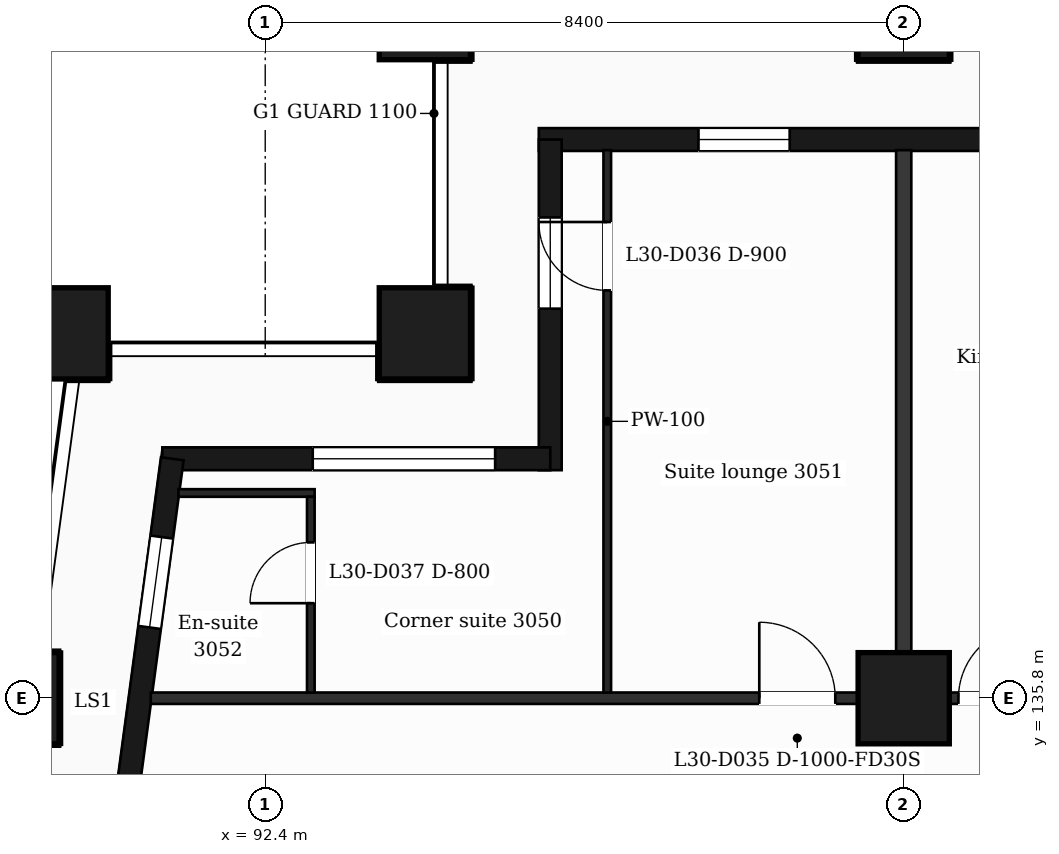
"""IFC4 building model, lengths in metres.
Left out: names, types, materials, properties, quantities, classifications, styles, units other than length and angle.
Written with IfcOpenShell. Run it as: python <this file> out.ifc"""

import sys

from ifc_helpers import new_model, si_unit, direction, frame, frame_2d, origin, origin_2d, place, context, subcontext, project, spatial, rectangle, extrude, element, fill, save


model = new_model("IFC4")
c1 = context("Model", 3, precision=1e-05, world=origin(), true_north=direction((0.0, 1.0)))
c2 = subcontext(c1, "Body", "Model", "MODEL_VIEW")
j1 = project(units=[si_unit("LENGTHUNIT", "METRE"), si_unit("PLANEANGLEUNIT", "RADIAN")], contexts=[c1])
p1 = place(None, origin())
s1 = spatial("IfcSite", under=j1, at=p1, CompositionType="ELEMENT")
p2 = place(p1, origin())
s2 = spatial("IfcBuilding", under=s1, at=p2, CompositionType="ELEMENT")
p3 = place(p2, frame((0.0, 0.0, 128.0)))
s3 = spatial("IfcBuildingStorey", under=s2, at=p3, CompositionType="ELEMENT", Elevation=128.0)
for number, where, z_axis, x_axis in (
    (1, (94.5, 140.6, 0.0), (0.0, 0.0, 1.0), (1.0, 0.0, 0.0)),
    (2, (89.735, 140.6, 0.0), (0.0, 0.0, 1.0), (1.0, 0.0, 0.0)),
    (3, (100.8, 135.8, 0.0), (0.0, 0.0, 1.0), (1.0, 0.0, 0.0)),
    (4, (89.088, 135.8, 0.0), (0.0, 0.0, 1.0), (1.0, 0.0, 0.0)),
    (5, (100.8, 144.8, 0.0), (0.0, 0.0, 1.0), (1.0, 0.0, 0.0)),
    (6, (94.5, 144.8, 0.0), (0.0, 0.0, 1.0), (1.0, 0.0, 0.0)),
):
    element("IfcColumn", number, at=place(p3, frame(where, z_axis=z_axis, x_axis=x_axis)), inside=s3, PredefinedType="COLUMN", context=c2, shape_type="SweptSolid", body=[
        extrude(rectangle(XDim=1.2, YDim=1.2, at=origin_2d()), origin(), (0.0, 0.0, 1.0), 3.7),
    ])
p4 = place(p3, frame((110.4, 143.15, 0.0), z_axis=(0.0, 0.0, 1.0), x_axis=(-1.0, 0.0, 0.0)))
e7 = element("IfcWall", 7, at=p4, inside=s3, PredefinedType="SOLIDWALL", context=c2, shape_type="SweptSolid", body=[
    extrude(rectangle(XDim=14.4, YDim=0.3, at=frame_2d((7.2, 0.0))), origin(), (0.0, 0.0, 1.0), 3.38),
])
p5 = place(p4, frame((2.1, 0.0, 0.9)))
e8 = element("IfcOpeningElement", 8, at=p5, cuts=e7, PredefinedType="OPENING", context=c2, shape_type="SweptSolid", body=[
    extrude(rectangle(XDim=2.4, YDim=2.1, at=frame_2d((1.2, 1.05))), frame((0.0, 0.16, 0.0), z_axis=(0.0, -1.0, 0.0), x_axis=(1.0, 0.0, 0.0)), (0.0, 0.0, 1.0), 0.32),
])
p6 = place(p4, frame((6.9, 0.0, 0.0)))
e9 = element("IfcOpeningElement", 9, at=p6, cuts=e7, PredefinedType="OPENING", context=c2, shape_type="SweptSolid", body=[
    extrude(rectangle(XDim=1.2, YDim=2.4, at=frame_2d((0.6, 1.2))), frame((0.0, 0.16, 0.0), z_axis=(0.0, -1.0, 0.0), x_axis=(1.0, 0.0, 0.0)), (0.0, 0.0, 1.0), 0.32),
])
p7 = place(p4, frame((11.1, 0.0, 0.9)))
e10 = element("IfcOpeningElement", 10, at=p7, cuts=e7, PredefinedType="OPENING", context=c2, shape_type="SweptSolid", body=[
    extrude(rectangle(XDim=1.2, YDim=2.1, at=frame_2d((0.6, 1.05))), frame((0.0, 0.16, 0.0), z_axis=(0.0, -1.0, 0.0), x_axis=(1.0, 0.0, 0.0)), (0.0, 0.0, 1.0), 0.32),
])
p8 = place(p3, frame((96.15, 143.15, 0.0), z_axis=(0.0, 0.0, 1.0), x_axis=(0.0, -1.0, 0.0)))
e11 = element("IfcWall", 11, at=p8, inside=s3, PredefinedType="SOLIDWALL", context=c2, shape_type="SweptSolid", body=[
    extrude(rectangle(XDim=4.35, YDim=0.3, at=frame_2d((2.175, 0.0))), origin(), (0.0, 0.0, 1.0), 3.38),
])
p9 = place(p8, frame((1.025, 0.0, 0.9)))
e12 = element("IfcOpeningElement", 12, at=p9, cuts=e11, PredefinedType="OPENING", context=c2, shape_type="SweptSolid", body=[
    extrude(rectangle(XDim=1.2, YDim=2.1, at=frame_2d((0.6, 1.05))), frame((0.0, 0.16, 0.0), z_axis=(0.0, -1.0, 0.0), x_axis=(1.0, 0.0, 0.0)), (0.0, 0.0, 1.0), 0.32),
])
p10 = place(p3, frame((96.15, 138.95, 0.0), z_axis=(0.0, 0.0, 1.0), x_axis=(-1.0, 0.0, 0.0)))
e13 = element("IfcWall", 13, at=p10, inside=s3, PredefinedType="SOLIDWALL", context=c2, shape_type="SweptSolid", body=[
    extrude(rectangle(XDim=5.104, YDim=0.3, at=frame_2d((2.552, 0.0))), origin(), (0.0, 0.0, 1.0), 3.38),
])
p11 = place(p10, frame((0.725, 0.0, 0.9)))
e14 = element("IfcOpeningElement", 14, at=p11, cuts=e13, PredefinedType="OPENING", context=c2, shape_type="SweptSolid", body=[
    extrude(rectangle(XDim=2.4, YDim=2.1, at=frame_2d((1.2, 1.05))), frame((0.0, 0.16, 0.0), z_axis=(0.0, -1.0, 0.0), x_axis=(1.0, 0.0, 0.0)), (0.0, 0.0, 1.0), 0.32),
])
p12 = place(p3, frame((91.177, 138.95, 0.0), z_axis=(0.0, 0.0, 1.0), x_axis=(-0.133426664613, -0.991058689065, 0.0)))
e15 = element("IfcWall", 15, at=p12, inside=s3, PredefinedType="SOLIDWALL", context=c2, shape_type="SweptSolid", body=[
    extrude(rectangle(XDim=6.609, YDim=0.3, at=frame_2d((3.305, 0.0))), origin(), (0.0, 0.0, 1.0), 3.38),
])
p13 = place(p12, frame((1.039, 0.0, 0.9)))
e16 = element("IfcOpeningElement", 16, at=p13, cuts=e15, PredefinedType="OPENING", context=c2, shape_type="SweptSolid", body=[
    extrude(rectangle(XDim=1.2, YDim=2.1, at=frame_2d((0.6, 1.05))), frame((0.0, 0.16, 0.0), z_axis=(0.0, -1.0, 0.0), x_axis=(1.0, 0.0, 0.0)), (0.0, 0.0, 1.0), 0.32),
])
p14 = place(p12, frame((4.294, 0.0, 0.0)))
e17 = element("IfcOpeningElement", 17, at=p14, cuts=e15, PredefinedType="OPENING", context=c2, shape_type="SweptSolid", body=[
    extrude(rectangle(XDim=1.2, YDim=2.4, at=frame_2d((0.6, 1.2))), frame((0.0, 0.16, 0.0), z_axis=(0.0, -1.0, 0.0), x_axis=(1.0, 0.0, 0.0)), (0.0, 0.0, 1.0), 0.32),
])
p15 = place(p3, frame((90.895, 135.8, 0.0), z_axis=(0.0, 0.0, 1.0), x_axis=(1.0, 0.0, 0.0)))
e18 = element("IfcWall", 18, at=p15, inside=s3, PredefinedType="PARTITIONING", context=c2, shape_type="SweptSolid", body=[
    extrude(rectangle(XDim=45.011, YDim=0.15, at=frame_2d((22.505, 0.0))), origin(), (0.0, 0.0, 1.0), 3.38),
])
p16 = place(p15, frame((8.005, 0.0, 0.0)))
e19 = element("IfcOpeningElement", 19, at=p16, cuts=e18, PredefinedType="OPENING", context=c2, shape_type="SweptSolid", body=[
    extrude(rectangle(XDim=1.0, YDim=2.1, at=frame_2d((0.5, 1.05))), frame((0.0, 0.085, 0.0), z_axis=(0.0, -1.0, 0.0), x_axis=(1.0, 0.0, 0.0)), (0.0, 0.0, 1.0), 0.17),
])
p17 = place(p15, frame((10.625, 0.0, 0.0)))
e20 = element("IfcOpeningElement", 20, at=p17, cuts=e18, PredefinedType="OPENING", context=c2, shape_type="SweptSolid", body=[
    extrude(rectangle(XDim=0.95, YDim=2.1, at=frame_2d((0.475, 1.05))), frame((0.0, 0.085, 0.0), z_axis=(0.0, -1.0, 0.0), x_axis=(1.0, 0.0, 0.0)), (0.0, 0.0, 1.0), 0.17),
])
p18 = place(p15, frame((14.38, 0.0, 0.0)))
e21 = element("IfcOpeningElement", 21, at=p18, cuts=e18, PredefinedType="OPENING", context=c2, shape_type="SweptSolid", body=[
    extrude(rectangle(XDim=0.95, YDim=2.1, at=frame_2d((0.475, 1.05))), frame((0.0, 0.085, 0.0), z_axis=(0.0, -1.0, 0.0), x_axis=(1.0, 0.0, 0.0)), (0.0, 0.0, 1.0), 0.17),
])
p19 = place(p15, frame((21.265, 0.0, 0.0)))
e22 = element("IfcOpeningElement", 22, at=p19, cuts=e18, PredefinedType="OPENING", context=c2, shape_type="SweptSolid", body=[
    extrude(rectangle(XDim=0.95, YDim=2.1, at=frame_2d((0.475, 1.05))), frame((0.0, 0.085, 0.0), z_axis=(0.0, -1.0, 0.0), x_axis=(1.0, 0.0, 0.0)), (0.0, 0.0, 1.0), 0.17),
])
p20 = place(p15, frame((30.835, 0.0, 0.0)))
e23 = element("IfcOpeningElement", 23, at=p20, cuts=e18, PredefinedType="OPENING", context=c2, shape_type="SweptSolid", body=[
    extrude(rectangle(XDim=0.95, YDim=2.1, at=frame_2d((0.475, 1.05))), frame((0.0, 0.085, 0.0), z_axis=(0.0, -1.0, 0.0), x_axis=(1.0, 0.0, 0.0)), (0.0, 0.0, 1.0), 0.17),
])
p21 = place(p15, frame((39.814, 0.0, 0.0)))
e24 = element("IfcOpeningElement", 24, at=p21, cuts=e18, PredefinedType="OPENING", context=c2, shape_type="SweptSolid", body=[
    extrude(rectangle(XDim=0.95, YDim=2.1, at=frame_2d((0.475, 1.05))), frame((0.0, 0.085, 0.0), z_axis=(0.0, -1.0, 0.0), x_axis=(1.0, 0.0, 0.0)), (0.0, 0.0, 1.0), 0.17),
])
p22 = place(p3, frame((91.258, 138.5, 0.0), z_axis=(0.0, 0.0, 1.0), x_axis=(1.0, 0.0, 0.0)))
e25 = element("IfcWall", 25, at=p22, inside=s3, PredefinedType="PARTITIONING", context=c2, shape_type="SweptSolid", body=[
    extrude(rectangle(XDim=1.792, YDim=0.1, at=frame_2d((0.896, 0.0))), origin(), (0.0, 0.0, 1.0), 3.38),
])
p23 = place(p3, frame((93.0, 135.875, 0.0), z_axis=(0.0, 0.0, 1.0), x_axis=(0.0, 1.0, 0.0)))
e26 = element("IfcWall", 26, at=p23, inside=s3, PredefinedType="PARTITIONING", context=c2, shape_type="SweptSolid", body=[
    extrude(rectangle(XDim=2.575, YDim=0.1, at=frame_2d((1.288, 0.0))), origin(), (0.0, 0.0, 1.0), 3.38),
])
p24 = place(p23, frame((1.175, 0.0, 0.0)))
e27 = element("IfcOpeningElement", 27, at=p24, cuts=e26, PredefinedType="OPENING", context=c2, shape_type="SweptSolid", body=[
    extrude(rectangle(XDim=0.8, YDim=2.1, at=frame_2d((0.4, 1.05))), frame((0.0, 0.06, 0.0), z_axis=(0.0, -1.0, 0.0), x_axis=(1.0, 0.0, 0.0)), (0.0, 0.0, 1.0), 0.12),
])
p25 = place(p3, frame((96.9, 135.875, 0.0), z_axis=(0.0, 0.0, 1.0), x_axis=(0.0, 1.0, 0.0)))
e28 = element("IfcWall", 28, at=p25, inside=s3, PredefinedType="PARTITIONING", context=c2, shape_type="SweptSolid", body=[
    extrude(rectangle(XDim=7.135, YDim=0.1, at=frame_2d((3.567, 0.0))), origin(), (0.0, 0.0, 1.0), 3.38),
])
p26 = place(p25, frame((5.29, 0.0, 0.0)))
e29 = element("IfcOpeningElement", 29, at=p26, cuts=e28, PredefinedType="OPENING", context=c2, shape_type="SweptSolid", body=[
    extrude(rectangle(XDim=0.9, YDim=2.1, at=frame_2d((0.45, 1.05))), frame((0.0, 0.06, 0.0), z_axis=(0.0, -1.0, 0.0), x_axis=(1.0, 0.0, 0.0)), (0.0, 0.0, 1.0), 0.12),
])
p27 = place(p3, frame((100.8, 135.875, 0.0), z_axis=(0.0, 0.0, 1.0), x_axis=(0.0, 1.0, 0.0)))
e30 = element("IfcWall", 30, at=p27, inside=s3, PredefinedType="PARTITIONING", context=c2, shape_type="SweptSolid", body=[
    extrude(rectangle(XDim=7.135, YDim=0.2, at=frame_2d((3.567, 0.0))), origin(), (0.0, 0.0, 1.0), 3.38),
])
p28 = place(p7, origin())
e31 = element("IfcWindow", 31, at=p28, inside=s3, PartitioningType="SINGLE_PANEL", PredefinedType="WINDOW", context=c2, shape_type="SweptSolid", body=[
    extrude(rectangle(XDim=1.2, YDim=2.1, at=frame_2d((0.6, 1.05))), frame((0.0, 0.03, 0.0), z_axis=(0.0, -1.0, 0.0), x_axis=(1.0, 0.0, 0.0)), (0.0, 0.0, 1.0), 0.06),
])
fill(e10, e31)
p29 = place(p9, origin())
e32 = element("IfcWindow", 32, at=p29, inside=s3, PartitioningType="SINGLE_PANEL", PredefinedType="WINDOW", context=c2, shape_type="SweptSolid", body=[
    extrude(rectangle(XDim=1.2, YDim=2.1, at=frame_2d((0.6, 1.05))), frame((0.0, 0.03, 0.0), z_axis=(0.0, -1.0, 0.0), x_axis=(1.0, 0.0, 0.0)), (0.0, 0.0, 1.0), 0.06),
])
fill(e12, e32)
p30 = place(p11, origin())
e33 = element("IfcWindow", 33, at=p30, inside=s3, PartitioningType="SINGLE_PANEL", PredefinedType="WINDOW", context=c2, shape_type="SweptSolid", body=[
    extrude(rectangle(XDim=2.4, YDim=2.1, at=frame_2d((1.2, 1.05))), frame((0.0, 0.03, 0.0), z_axis=(0.0, -1.0, 0.0), x_axis=(1.0, 0.0, 0.0)), (0.0, 0.0, 1.0), 0.06),
])
fill(e14, e33)
p31 = place(p13, origin())
e34 = element("IfcWindow", 34, at=p31, inside=s3, PartitioningType="SINGLE_PANEL", PredefinedType="WINDOW", context=c2, shape_type="SweptSolid", body=[
    extrude(rectangle(XDim=1.2, YDim=2.1, at=frame_2d((0.6, 1.05))), frame((0.0, 0.03, 0.0), z_axis=(0.0, -1.0, 0.0), x_axis=(1.0, 0.0, 0.0)), (0.0, 0.0, 1.0), 0.06),
])
fill(e16, e34)
p32 = place(p16, origin())
e35 = element("IfcDoor", 35, at=p32, inside=s3, OperationType="SINGLE_SWING_LEFT", PredefinedType="DOOR", context=c2, shape_type="SweptSolid", body=[
    extrude(rectangle(XDim=1.0, YDim=2.1, at=frame_2d((0.5, 1.05))), frame((0.0, 0.025, 0.0), z_axis=(0.0, -1.0, 0.0), x_axis=(1.0, 0.0, 0.0)), (0.0, 0.0, 1.0), 0.05),
])
fill(e19, e35)
p33 = place(p26, origin())
e36 = element("IfcDoor", 36, at=p33, inside=s3, OperationType="SINGLE_SWING_RIGHT", PredefinedType="DOOR", context=c2, shape_type="SweptSolid", body=[
    extrude(rectangle(XDim=0.9, YDim=2.1, at=frame_2d((0.45, 1.05))), frame((0.0, 0.025, 0.0), z_axis=(0.0, -1.0, 0.0), x_axis=(1.0, 0.0, 0.0)), (0.0, 0.0, 1.0), 0.05),
])
fill(e29, e36)
p34 = place(p24, origin())
e37 = element("IfcDoor", 37, at=p34, inside=s3, OperationType="SINGLE_SWING_LEFT", PredefinedType="DOOR", context=c2, shape_type="SweptSolid", body=[
    extrude(rectangle(XDim=0.8, YDim=2.1, at=frame_2d((0.4, 1.05))), frame((0.0, 0.025, 0.0), z_axis=(0.0, -1.0, 0.0), x_axis=(1.0, 0.0, 0.0)), (0.0, 0.0, 1.0), 0.05),
])
fill(e27, e37)
p35 = place(p17, origin())
e38 = element("IfcDoor", 38, at=p35, inside=s3, OperationType="SINGLE_SWING_RIGHT", PredefinedType="DOOR", context=c2, shape_type="SweptSolid", body=[
    extrude(rectangle(XDim=0.95, YDim=2.1, at=frame_2d((0.475, 1.05))), frame((0.0, 0.025, 0.0), z_axis=(0.0, -1.0, 0.0), x_axis=(1.0, 0.0, 0.0)), (0.0, 0.0, 1.0), 0.05),
])
fill(e20, e38)
save(model, sys.argv[1])
